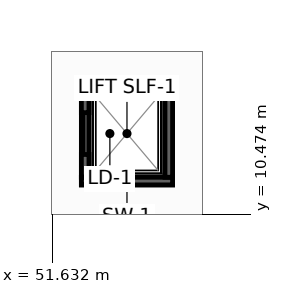
"""IFC4 building model, lengths in metres.
Left out: names, types, materials, properties, quantities, classifications, styles, units other than length and angle.
Written with IfcOpenShell. Run it as: python <this file> out.ifc"""

import sys

from ifc_helpers import new_model, si_unit, direction, frame, frame_2d, origin, place, context, subcontext, project, spatial, rectangle, extrude, element, fill, save


model = new_model("IFC4")
c1 = context("Model", 3, precision=1e-05, world=origin(), true_north=direction((0.0, 1.0)))
c2 = subcontext(c1, "Body", "Model", "MODEL_VIEW")
j1 = project(units=[si_unit("LENGTHUNIT", "METRE"), si_unit("PLANEANGLEUNIT", "RADIAN")], contexts=[c1])
p1 = place(None, origin())
s1 = spatial("IfcSite", under=j1, at=p1, CompositionType="ELEMENT")
p2 = place(p1, origin())
s2 = spatial("IfcBuilding", under=s1, at=p2, CompositionType="ELEMENT")
p3 = place(p2, frame((0.0, 0.0, -10.8)))
s3 = spatial("IfcBuildingStorey", under=s2, at=p3, CompositionType="ELEMENT", Elevation=-10.8)
for number, where, z_axis, x_axis in (
    (1, (52.4, 11.35, -1.48), (0.0, 0.0, 1.0), (1.0, 0.0, 0.0)),
    (2, (52.4, 13.85, -1.48), (0.0, 0.0, 1.0), (1.0, 0.0, 0.0)),
):
    element("IfcWall", number, at=place(p3, frame(where, z_axis=z_axis, x_axis=x_axis)), inside=s3, PredefinedType="SHEAR", context=c2, shape_type="SweptSolid", body=[
        extrude(rectangle(XDim=2.4, YDim=0.2, at=frame_2d((1.2, 0.0))), origin(), (0.0, 0.0, 1.0), 1.48),
    ])
for number, where, z_axis, x_axis in (
    (3, (52.5, 11.45, -1.48), (0.0, 0.0, 1.0), (0.0, 1.0, 0.0)),
    (4, (54.7, 11.45, -1.48), (0.0, 0.0, 1.0), (0.0, 1.0, 0.0)),
):
    element("IfcWall", number, at=place(p3, frame(where, z_axis=z_axis, x_axis=x_axis)), inside=s3, PredefinedType="SHEAR", context=c2, shape_type="SweptSolid", body=[
        extrude(rectangle(XDim=2.3, YDim=0.2, at=frame_2d((1.15, 0.0))), origin(), (0.0, 0.0, 1.0), 1.48),
    ])
for number, where, z_axis, x_axis in (
    (5, (52.4, 11.35, 0.0), (0.0, 0.0, 1.0), (1.0, 0.0, 0.0)),
    (6, (52.4, 13.85, 0.0), (0.0, 0.0, 1.0), (1.0, 0.0, 0.0)),
):
    element("IfcWall", number, at=place(p3, frame(where, z_axis=z_axis, x_axis=x_axis)), inside=s3, PredefinedType="SHEAR", context=c2, shape_type="SweptSolid", body=[
        extrude(rectangle(XDim=2.4, YDim=0.2, at=frame_2d((1.2, 0.0))), origin(), (0.0, 0.0, 1.0), 5.05),
    ])
p4 = place(p3, frame((52.5, 11.45, 0.0), z_axis=(0.0, 0.0, 1.0), x_axis=(0.0, 1.0, 0.0)))
e7 = element("IfcWall", 7, at=p4, inside=s3, PredefinedType="SHEAR", context=c2, shape_type="SweptSolid", body=[
    extrude(rectangle(XDim=2.3, YDim=0.2, at=frame_2d((1.15, 0.0))), origin(), (0.0, 0.0, 1.0), 5.05),
])
p5 = place(p4, frame((0.6, 0.0, 0.0)))
e8 = element("IfcOpeningElement", 8, at=p5, cuts=e7, PredefinedType="OPENING", context=c2, shape_type="SweptSolid", body=[
    extrude(rectangle(XDim=1.1, YDim=2.2, at=frame_2d((0.55, 1.1))), frame((0.0, 0.11, 0.0), z_axis=(0.0, -1.0, 0.0), x_axis=(1.0, 0.0, 0.0)), (0.0, 0.0, 1.0), 0.22),
])
p6 = place(p3, frame((54.7, 11.45, 0.0), z_axis=(0.0, 0.0, 1.0), x_axis=(0.0, 1.0, 0.0)))
e9 = element("IfcWall", 9, at=p6, inside=s3, PredefinedType="SHEAR", context=c2, shape_type="SweptSolid", body=[
    extrude(rectangle(XDim=2.3, YDim=0.2, at=frame_2d((1.15, 0.0))), origin(), (0.0, 0.0, 1.0), 5.05),
])
p7 = place(p5, origin())
e10 = element("IfcDoor", 10, at=p7, inside=s3, OperationType="SLIDING_TO_LEFT", PredefinedType="DOOR", context=c2, shape_type="SweptSolid", body=[
    extrude(rectangle(XDim=1.1, YDim=2.2, at=frame_2d((0.55, 1.1))), frame((0.0, 0.025, 0.0), z_axis=(0.0, -1.0, 0.0), x_axis=(1.0, 0.0, 0.0)), (0.0, 0.0, 1.0), 0.05),
])
fill(e8, e10)
save(model, sys.argv[1])
